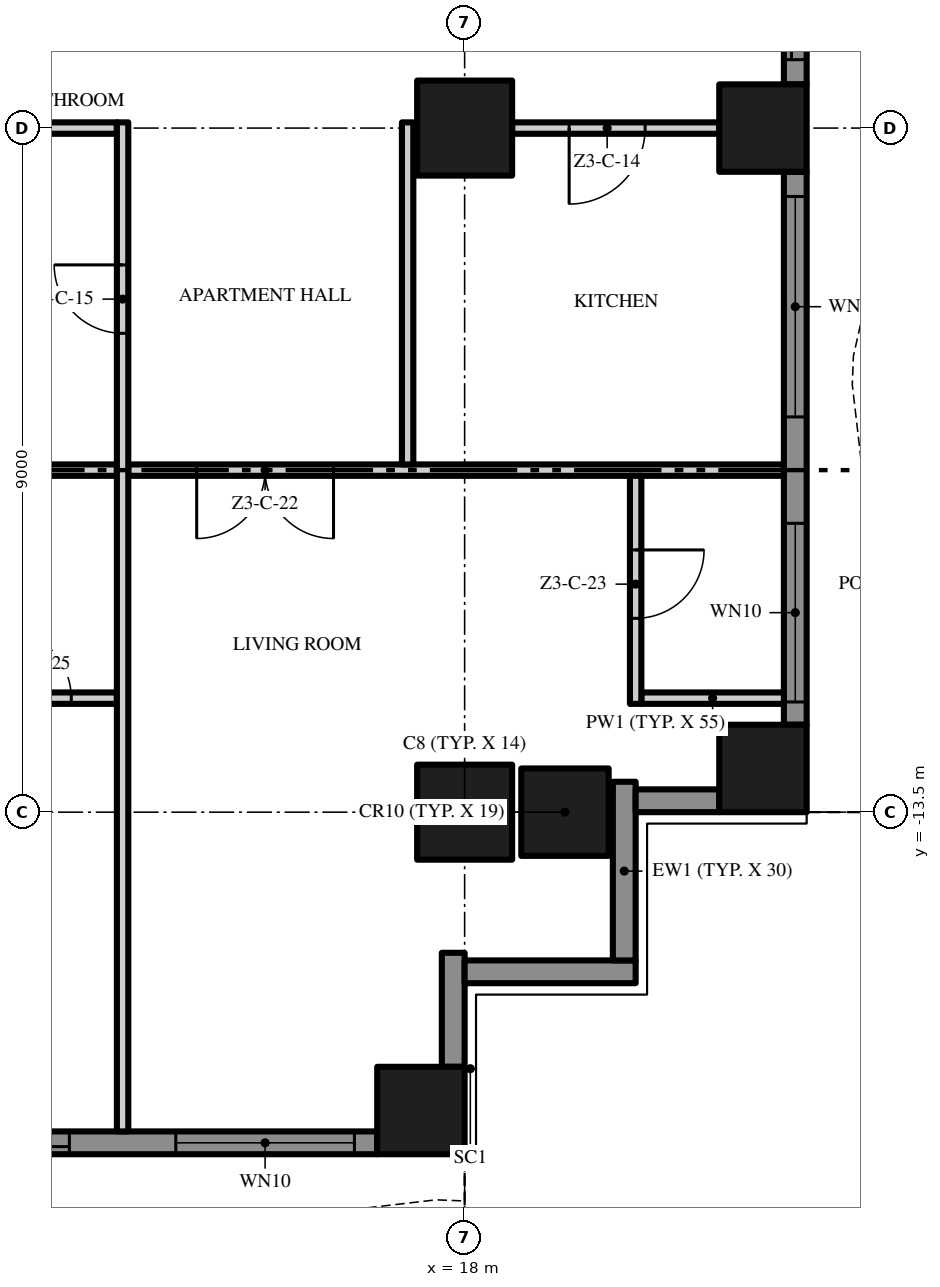
"""IFC4 building model, lengths in metres.
Left out: names, types, materials, properties, quantities, classifications, styles, units other than length and angle.
Written with IfcOpenShell. Run it as: python <this file> out.ifc"""

import sys

from ifc_helpers import new_model, si_unit, direction, frame, frame_2d, origin, origin_2d, place, context, subcontext, project, spatial, polyline, rectangle, outline, extrude, element, fill, save


model = new_model("IFC4")
c1 = context("Model", 3, precision=1e-05, world=origin(), true_north=direction((0.0, 1.0)))
c2 = subcontext(c1, "Body", "Model", "MODEL_VIEW")
j1 = project(units=[si_unit("LENGTHUNIT", "METRE"), si_unit("PLANEANGLEUNIT", "RADIAN")], contexts=[c1])
p1 = place(None, origin())
s1 = spatial("IfcSite", under=j1, at=p1, CompositionType="ELEMENT")
p2 = place(p1, origin())
s2 = spatial("IfcBuilding", under=s1, at=p2, CompositionType="ELEMENT")
p3 = place(p2, frame((0.0, 0.0, 155.4)))
s3 = spatial("IfcBuildingStorey", under=s2, at=p3, CompositionType="ELEMENT", Elevation=155.4)
p4 = place(p3, frame((18.0, -13.5, 0.0), z_axis=(0.0, 0.0, 1.0), x_axis=(1.0, 0.0, 0.0)))
e1 = element("IfcColumn", 1, at=p4, inside=s3, PredefinedType="COLUMN", context=c2, shape_type="SweptSolid", body=[
    extrude(rectangle(XDim=1.25, YDim=1.25, at=origin_2d()), origin(), (0.0, 0.0, 1.0), 3.5),
])
p5 = place(p3, frame((17.425, -17.425, 0.0), z_axis=(0.0, 0.0, 1.0), x_axis=(1.0, 0.0, 0.0)))
e2 = element("IfcColumn", 2, at=p5, inside=s3, PredefinedType="COLUMN", context=c2, shape_type="SweptSolid", body=[
    extrude(rectangle(XDim=1.15, YDim=1.15, at=origin_2d()), origin(), (0.0, 0.0, 1.0), 3.5),
])
p6 = place(p3, frame((18.0, -4.5, 0.0), z_axis=(0.0, 0.0, 1.0), x_axis=(1.0, 0.0, 0.0)))
e3 = element("IfcColumn", 3, at=p6, inside=s3, PredefinedType="COLUMN", context=c2, shape_type="SweptSolid", body=[
    extrude(rectangle(XDim=1.25, YDim=1.25, at=origin_2d()), origin(), (0.0, 0.0, 1.0), 3.5),
])
for number, where, z_axis, x_axis in (
    (4, (21.925, -12.925, 0.0), (0.0, 0.0, 1.0), (1.0, 0.0, 0.0)),
    (5, (19.32, -13.5, 0.0), (0.0, 0.0, 1.0), (1.0, 0.0, 0.0)),
    (6, (21.925, -4.5, 0.0), (0.0, 0.0, 1.0), (1.0, 0.0, 0.0)),
):
    element("IfcColumn", number, at=place(p3, frame(where, z_axis=z_axis, x_axis=x_axis)), inside=s3, PredefinedType="COLUMN", context=c2, shape_type="SweptSolid", body=[
        extrude(rectangle(XDim=1.15, YDim=1.15, at=origin_2d()), origin(), (0.0, 0.0, 1.0), 3.5),
    ])
p7 = place(p3, frame((16.85, -17.85, 0.0), z_axis=(0.0, 0.0, 1.0), x_axis=(-1.0, 0.0, 0.0)))
e7 = element("IfcWall", 7, at=p7, inside=s3, PredefinedType="SOLIDWALL", context=c2, shape_type="SweptSolid", body=[
    extrude(rectangle(XDim=7.275, YDim=0.3, at=frame_2d((3.638, 0.0))), origin(), (0.0, 0.0, 1.0), 3.5),
])
p8 = place(p7, frame((4.05, 0.0, 0.0)))
e8 = element("IfcOpeningElement", 8, at=p8, cuts=e7, PredefinedType="OPENING", context=c2, shape_type="SweptSolid", body=[
    extrude(rectangle(XDim=2.9, YDim=2.4, at=frame_2d((1.45, 1.2))), frame((0.0, 0.16, 0.0), z_axis=(0.0, -1.0, 0.0), x_axis=(1.0, 0.0, 0.0)), (0.0, 0.0, 1.0), 0.32),
])
p9 = place(p7, frame((0.3, 0.0, 0.45)))
e9 = element("IfcOpeningElement", 9, at=p9, cuts=e7, PredefinedType="OPENING", context=c2, shape_type="SweptSolid", body=[
    extrude(rectangle(XDim=2.35, YDim=2.65, at=frame_2d((1.175, 1.325))), frame((0.0, 0.16, 0.0), z_axis=(0.0, -1.0, 0.0), x_axis=(1.0, 0.0, 0.0)), (0.0, 0.0, 1.0), 0.32),
])
p10 = place(p3, frame((17.85, -15.35, 0.0), z_axis=(0.0, 0.0, 1.0), x_axis=(0.0, -1.0, 0.0)))
e10 = element("IfcWall", 10, at=p10, inside=s3, PredefinedType="SOLIDWALL", context=c2, shape_type="SweptSolid", body=[
    extrude(rectangle(XDim=1.5, YDim=0.3, at=frame_2d((0.75, 0.0))), origin(), (0.0, 0.0, 1.0), 3.5),
])
p11 = place(p3, frame((20.25, -15.6, 0.0), z_axis=(0.0, 0.0, 1.0), x_axis=(-1.0, 0.0, 0.0)))
e11 = element("IfcWall", 11, at=p11, inside=s3, PredefinedType="SOLIDWALL", context=c2, shape_type="SweptSolid", body=[
    extrude(rectangle(XDim=2.25, YDim=0.3, at=frame_2d((1.125, 0.0))), origin(), (0.0, 0.0, 1.0), 3.5),
])
p12 = place(p3, frame((20.1, -13.1, 0.0), z_axis=(0.0, 0.0, 1.0), x_axis=(0.0, -1.0, 0.0)))
e12 = element("IfcWall", 12, at=p12, inside=s3, PredefinedType="SOLIDWALL", context=c2, shape_type="SweptSolid", body=[
    extrude(rectangle(XDim=2.35, YDim=0.3, at=frame_2d((1.175, 0.0))), origin(), (0.0, 0.0, 1.0), 3.5),
])
p13 = place(p3, frame((21.35, -13.35, 0.0), z_axis=(0.0, 0.0, 1.0), x_axis=(-1.0, 0.0, 0.0)))
e13 = element("IfcWall", 13, at=p13, inside=s3, PredefinedType="SOLIDWALL", context=c2, shape_type="SweptSolid", body=[
    extrude(rectangle(XDim=1.1, YDim=0.3, at=frame_2d((0.55, 0.0))), origin(), (0.0, 0.0, 1.0), 3.5),
])
p14 = place(p3, frame((22.35, -5.075, 0.0), z_axis=(0.0, 0.0, 1.0), x_axis=(0.0, -1.0, 0.0)))
e14 = element("IfcWall", 14, at=p14, inside=s3, PredefinedType="SOLIDWALL", context=c2, shape_type="SweptSolid", body=[
    extrude(rectangle(XDim=7.275, YDim=0.3, at=frame_2d((3.638, 0.0))), origin(), (0.0, 0.0, 1.0), 3.5),
])
p15 = place(p14, frame((4.625, 0.0, 0.45)))
e15 = element("IfcOpeningElement", 15, at=p15, cuts=e14, PredefinedType="OPENING", context=c2, shape_type="SweptSolid", body=[
    extrude(rectangle(XDim=2.35, YDim=2.65, at=frame_2d((1.175, 1.325))), frame((0.0, 0.16, 0.0), z_axis=(0.0, -1.0, 0.0), x_axis=(1.0, 0.0, 0.0)), (0.0, 0.0, 1.0), 0.32),
])
p16 = place(p14, frame((0.325, 0.0, 0.45)))
e16 = element("IfcOpeningElement", 16, at=p16, cuts=e14, PredefinedType="OPENING", context=c2, shape_type="SweptSolid", body=[
    extrude(rectangle(XDim=2.9, YDim=2.65, at=frame_2d((1.45, 1.325))), frame((0.0, 0.16, 0.0), z_axis=(0.0, -1.0, 0.0), x_axis=(1.0, 0.0, 0.0)), (0.0, 0.0, 1.0), 0.32),
])
p17 = place(p3, frame((22.35, 3.925, 0.0), z_axis=(0.0, 0.0, 1.0), x_axis=(0.0, -1.0, 0.0)))
e17 = element("IfcWall", 17, at=p17, inside=s3, PredefinedType="SOLIDWALL", context=c2, shape_type="SweptSolid", body=[
    extrude(rectangle(XDim=7.85, YDim=0.3, at=frame_2d((3.925, 0.0))), origin(), (0.0, 0.0, 1.0), 3.5),
])
p18 = place(p17, frame((4.625, 0.0, 0.0)))
e18 = element("IfcOpeningElement", 18, at=p18, cuts=e17, PredefinedType="OPENING", context=c2, shape_type="SweptSolid", body=[
    extrude(rectangle(XDim=2.9, YDim=2.4, at=frame_2d((1.45, 1.2))), frame((0.0, 0.16, 0.0), z_axis=(0.0, -1.0, 0.0), x_axis=(1.0, 0.0, 0.0)), (0.0, 0.0, 1.0), 0.32),
])
p19 = place(p17, frame((0.325, 0.0, 0.0)))
e19 = element("IfcOpeningElement", 19, at=p19, cuts=e17, PredefinedType="OPENING", context=c2, shape_type="SweptSolid", body=[
    extrude(rectangle(XDim=2.9, YDim=2.4, at=frame_2d((1.45, 1.2))), frame((0.0, 0.16, 0.0), z_axis=(0.0, -1.0, 0.0), x_axis=(1.0, 0.0, 0.0)), (0.0, 0.0, 1.0), 0.32),
])
p20 = place(p3, origin())
e20 = element("IfcWall", 20, at=p20, inside=s3, PredefinedType="USERDEFINED", context=c2, shape_type="SweptSolid", body=[
    extrude(outline(polyline([(-18.0, -20.649), (-16.5, -19.988), (-15.0, -19.255), (-13.5, -18.731), (-12.375, -18.6), (-12.0, -18.615), (-10.5, -18.951), (-9.0, -19.612), (-7.5, -20.345), (-6.0, -20.869), (-4.875, -21.0), (-4.5, -20.985), (-3.0, -20.649), (-1.5, -19.988), (0.0, -19.255), (1.5, -18.731), (2.625, -18.6), (3.0, -18.615), (4.5, -18.951), (6.0, -19.612), (7.5, -20.345), (9.0, -20.869), (10.125, -21.0), (10.5, -20.985), (12.0, -20.649), (13.5, -19.988), (15.0, -19.255), (16.5, -18.731), (17.625, -18.6), (18.0, -18.615), (18.01, -18.365), (17.615, -18.349), (16.444, -18.486), (14.904, -19.024), (13.395, -19.761), (11.921, -20.41), (10.467, -20.736), (10.135, -20.749), (9.056, -20.624), (7.596, -20.114), (6.105, -19.385), (4.579, -18.713), (3.033, -18.366), (2.615, -18.349), (1.444, -18.486), (-0.096, -19.024), (-1.605, -19.761), (-3.079, -20.41), (-4.533, -20.736), (-4.865, -20.749), (-5.944, -20.624), (-7.404, -20.114), (-8.895, -19.385), (-10.421, -18.713), (-11.967, -18.366), (-12.385, -18.349), (-13.556, -18.486), (-15.096, -19.024), (-16.605, -19.761), (-18.101, -20.42), (-18.0, -20.649)])), origin(), (0.0, 0.0, 1.0), 0.9),
])
p21 = place(p3, origin())
e21 = element("IfcWall", 21, at=p21, inside=s3, PredefinedType="USERDEFINED", context=c2, shape_type="SweptSolid", body=[
    extrude(outline(polyline([(25.149, -13.5), (24.488, -12.0), (23.755, -10.5), (23.231, -9.0), (23.1, -7.875), (23.115, -7.5), (23.451, -6.0), (24.112, -4.5), (24.845, -3.0), (25.369, -1.5), (25.5, -0.375), (25.485, 0.0), (25.149, 1.5), (24.488, 3.0), (23.755, 4.5), (23.231, 6.0), (23.1, 7.125), (23.115, 7.5), (23.451, 9.0), (24.112, 10.5), (24.845, 12.0), (25.369, 13.5), (25.5, 14.625), (25.485, 15.0), (25.149, 16.5), (24.488, 18.0), (24.259, 17.899), (24.91, 16.421), (25.236, 14.967), (25.249, 14.635), (25.124, 13.556), (24.614, 12.096), (23.885, 10.605), (23.213, 9.079), (22.866, 7.533), (22.849, 7.115), (22.986, 5.944), (23.524, 4.404), (24.261, 2.895), (24.91, 1.421), (25.236, -0.033), (25.249, -0.365), (25.124, -1.444), (24.614, -2.904), (23.885, -4.395), (23.213, -5.921), (22.866, -7.467), (22.849, -7.885), (22.986, -9.056), (23.524, -10.596), (24.261, -12.105), (24.92, -13.601), (25.149, -13.5)])), origin(), (0.0, 0.0, 1.0), 0.9),
])
p22 = place(p3, frame((11.325, -12.0, 0.0), z_axis=(0.0, 0.0, 1.0), x_axis=(1.0, 0.0, 0.0)))
e22 = element("IfcWall", 22, at=p22, inside=s3, PredefinedType="PARTITIONING", context=c2, shape_type="SweptSolid", body=[
    extrude(rectangle(XDim=2.1, YDim=0.15, at=frame_2d((1.05, 0.0))), origin(), (0.0, 0.0, 1.0), 3.5),
])
p23 = place(p22, frame((0.6, 0.0, 0.0)))
e23 = element("IfcOpeningElement", 23, at=p23, cuts=e22, PredefinedType="OPENING", context=c2, shape_type="SweptSolid", body=[
    extrude(rectangle(XDim=0.9, YDim=2.1, at=frame_2d((0.45, 1.05))), frame((0.0, 0.085, 0.0), z_axis=(0.0, -1.0, 0.0), x_axis=(1.0, 0.0, 0.0)), (0.0, 0.0, 1.0), 0.17),
])
p24 = place(p3, frame((20.325, -12.0, 0.0), z_axis=(0.0, 0.0, 1.0), x_axis=(1.0, 0.0, 0.0)))
e24 = element("IfcWall", 24, at=p24, inside=s3, PredefinedType="PARTITIONING", context=c2, shape_type="SweptSolid", body=[
    extrude(rectangle(XDim=1.875, YDim=0.15, at=frame_2d((0.938, 0.0))), origin(), (0.0, 0.0, 1.0), 3.5),
])
p25 = place(p3, frame((11.325, -9.0, 0.0), z_axis=(0.0, 0.0, 1.0), x_axis=(1.0, 0.0, 0.0)))
e25 = element("IfcWall", 25, at=p25, inside=s3, PredefinedType="PARTITIONING", context=c2, shape_type="SweptSolid", body=[
    extrude(rectangle(XDim=2.1, YDim=0.15, at=frame_2d((1.05, 0.0))), origin(), (0.0, 0.0, 1.0), 3.5),
])
p26 = place(p3, frame((22.2, -9.0, 0.0), z_axis=(0.0, 0.0, 1.0), x_axis=(-1.0, 0.0, 0.0)))
e26 = element("IfcWall", 26, at=p26, inside=s3, PredefinedType="PARTITIONING", context=c2, shape_type="SweptSolid", body=[
    extrude(rectangle(XDim=8.625, YDim=0.15, at=frame_2d((4.312, 0.0))), origin(), (0.0, 0.0, 1.0), 3.5),
])
p27 = place(p26, frame((5.925, 0.0, 0.0)))
e27 = element("IfcOpeningElement", 27, at=p27, cuts=e26, PredefinedType="OPENING", context=c2, shape_type="SweptSolid", body=[
    extrude(rectangle(XDim=1.8, YDim=2.4, at=frame_2d((0.9, 1.2))), frame((0.0, 0.085, 0.0), z_axis=(0.0, -1.0, 0.0), x_axis=(1.0, 0.0, 0.0)), (0.0, 0.0, 1.0), 0.17),
])
p28 = place(p3, frame((11.325, -4.5, 0.0), z_axis=(0.0, 0.0, 1.0), x_axis=(1.0, 0.0, 0.0)))
e28 = element("IfcWall", 28, at=p28, inside=s3, PredefinedType="PARTITIONING", context=c2, shape_type="SweptSolid", body=[
    extrude(rectangle(XDim=2.1, YDim=0.15, at=frame_2d((1.05, 0.0))), origin(), (0.0, 0.0, 1.0), 3.5),
])
p29 = place(p3, frame((21.35, -4.5, 0.0), z_axis=(0.0, 0.0, 1.0), x_axis=(-1.0, 0.0, 0.0)))
e29 = element("IfcWall", 29, at=p29, inside=s3, PredefinedType="PARTITIONING", context=c2, shape_type="SweptSolid", body=[
    extrude(rectangle(XDim=2.725, YDim=0.15, at=frame_2d((1.363, 0.0))), origin(), (0.0, 0.0, 1.0), 3.5),
])
p30 = place(p29, frame((0.975, 0.0, 0.0)))
e30 = element("IfcOpeningElement", 30, at=p30, cuts=e29, PredefinedType="OPENING", context=c2, shape_type="SweptSolid", body=[
    extrude(rectangle(XDim=1.0, YDim=2.4, at=frame_2d((0.5, 1.2))), frame((0.0, 0.085, 0.0), z_axis=(0.0, -1.0, 0.0), x_axis=(1.0, 0.0, 0.0)), (0.0, 0.0, 1.0), 0.17),
])
p31 = place(p3, frame((13.5, -17.7, 0.0), z_axis=(0.0, 0.0, 1.0), x_axis=(0.0, 1.0, 0.0)))
e31 = element("IfcWall", 31, at=p31, inside=s3, PredefinedType="PARTITIONING", context=c2, shape_type="SweptSolid", body=[
    extrude(rectangle(XDim=13.275, YDim=0.15, at=frame_2d((6.638, 0.0))), origin(), (0.0, 0.0, 1.0), 3.5),
])
p32 = place(p31, frame((10.5, 0.0, 0.0)))
e32 = element("IfcOpeningElement", 32, at=p32, cuts=e31, PredefinedType="OPENING", context=c2, shape_type="SweptSolid", body=[
    extrude(rectangle(XDim=0.9, YDim=2.1, at=frame_2d((0.45, 1.05))), frame((0.0, 0.085, 0.0), z_axis=(0.0, -1.0, 0.0), x_axis=(1.0, 0.0, 0.0)), (0.0, 0.0, 1.0), 0.17),
])
p33 = place(p3, frame((17.25, -8.925, 0.0), z_axis=(0.0, 0.0, 1.0), x_axis=(0.0, 1.0, 0.0)))
e33 = element("IfcWall", 33, at=p33, inside=s3, PredefinedType="PARTITIONING", context=c2, shape_type="SweptSolid", body=[
    extrude(rectangle(XDim=4.5, YDim=0.15, at=frame_2d((2.25, 0.0))), origin(), (0.0, 0.0, 1.0), 3.5),
])
p34 = place(p3, frame((20.25, -9.075, 0.0), z_axis=(0.0, 0.0, 1.0), x_axis=(0.0, -1.0, 0.0)))
e34 = element("IfcWall", 34, at=p34, inside=s3, PredefinedType="PARTITIONING", context=c2, shape_type="SweptSolid", body=[
    extrude(rectangle(XDim=3.0, YDim=0.15, at=frame_2d((1.5, 0.0))), origin(), (0.0, 0.0, 1.0), 3.5),
])
p35 = place(p34, frame((0.975, 0.0, 0.0)))
e35 = element("IfcOpeningElement", 35, at=p35, cuts=e34, PredefinedType="OPENING", context=c2, shape_type="SweptSolid", body=[
    extrude(rectangle(XDim=0.9, YDim=2.1, at=frame_2d((0.45, 1.05))), frame((0.0, 0.085, 0.0), z_axis=(0.0, -1.0, 0.0), x_axis=(1.0, 0.0, 0.0)), (0.0, 0.0, 1.0), 0.17),
])
p36 = place(p8, origin())
e36 = element("IfcDoor", 36, at=p36, inside=s3, OperationType="SINGLE_SWING_LEFT", PredefinedType="DOOR", context=c2, shape_type="SweptSolid", body=[
    extrude(rectangle(XDim=2.9, YDim=2.4, at=frame_2d((1.45, 1.2))), frame((0.0, 0.025, 0.0), z_axis=(0.0, -1.0, 0.0), x_axis=(1.0, 0.0, 0.0)), (0.0, 0.0, 1.0), 0.05),
])
fill(e8, e36)
p37 = place(p9, origin())
e37 = element("IfcWindow", 37, at=p37, inside=s3, PartitioningType="SINGLE_PANEL", PredefinedType="WINDOW", context=c2, shape_type="SweptSolid", body=[
    extrude(rectangle(XDim=2.35, YDim=2.65, at=frame_2d((1.175, 1.325))), frame((0.0, 0.03, 0.0), z_axis=(0.0, -1.0, 0.0), x_axis=(1.0, 0.0, 0.0)), (0.0, 0.0, 1.0), 0.06),
])
fill(e9, e37)
p38 = place(p15, origin())
e38 = element("IfcWindow", 38, at=p38, inside=s3, PartitioningType="SINGLE_PANEL", PredefinedType="WINDOW", context=c2, shape_type="SweptSolid", body=[
    extrude(rectangle(XDim=2.35, YDim=2.65, at=frame_2d((1.175, 1.325))), frame((0.0, 0.03, 0.0), z_axis=(0.0, -1.0, 0.0), x_axis=(1.0, 0.0, 0.0)), (0.0, 0.0, 1.0), 0.06),
])
fill(e15, e38)
p39 = place(p16, origin())
e39 = element("IfcWindow", 39, at=p39, inside=s3, PartitioningType="SINGLE_PANEL", PredefinedType="WINDOW", context=c2, shape_type="SweptSolid", body=[
    extrude(rectangle(XDim=2.9, YDim=2.65, at=frame_2d((1.45, 1.325))), frame((0.0, 0.03, 0.0), z_axis=(0.0, -1.0, 0.0), x_axis=(1.0, 0.0, 0.0)), (0.0, 0.0, 1.0), 0.06),
])
fill(e16, e39)
p40 = place(p18, origin())
e40 = element("IfcDoor", 40, at=p40, inside=s3, OperationType="SINGLE_SWING_LEFT", PredefinedType="DOOR", context=c2, shape_type="SweptSolid", body=[
    extrude(rectangle(XDim=2.9, YDim=2.4, at=frame_2d((1.45, 1.2))), frame((0.0, 0.025, 0.0), z_axis=(0.0, -1.0, 0.0), x_axis=(1.0, 0.0, 0.0)), (0.0, 0.0, 1.0), 0.05),
])
fill(e18, e40)
p41 = place(p30, origin())
e41 = element("IfcDoor", 41, at=p41, inside=s3, OperationType="SINGLE_SWING_RIGHT", PredefinedType="DOOR", context=c2, shape_type="SweptSolid", body=[
    extrude(rectangle(XDim=1.0, YDim=2.4, at=frame_2d((0.5, 1.2))), frame((0.0, 0.025, 0.0), z_axis=(0.0, -1.0, 0.0), x_axis=(1.0, 0.0, 0.0)), (0.0, 0.0, 1.0), 0.05),
])
fill(e30, e41)
p42 = place(p32, origin())
e42 = element("IfcDoor", 42, at=p42, inside=s3, OperationType="SINGLE_SWING_RIGHT", PredefinedType="DOOR", context=c2, shape_type="SweptSolid", body=[
    extrude(rectangle(XDim=0.9, YDim=2.1, at=frame_2d((0.45, 1.05))), frame((0.0, 0.025, 0.0), z_axis=(0.0, -1.0, 0.0), x_axis=(1.0, 0.0, 0.0)), (0.0, 0.0, 1.0), 0.05),
])
fill(e32, e42)
p43 = place(p27, origin())
e43 = element("IfcDoor", 43, at=p43, inside=s3, OperationType="DOUBLE_DOOR_SINGLE_SWING", PredefinedType="DOOR", context=c2, shape_type="SweptSolid", body=[
    extrude(rectangle(XDim=1.8, YDim=2.4, at=frame_2d((0.9, 1.2))), frame((0.0, 0.025, 0.0), z_axis=(0.0, -1.0, 0.0), x_axis=(1.0, 0.0, 0.0)), (0.0, 0.0, 1.0), 0.05),
])
fill(e27, e43)
p44 = place(p35, origin())
e44 = element("IfcDoor", 44, at=p44, inside=s3, OperationType="SINGLE_SWING_LEFT", PredefinedType="DOOR", context=c2, shape_type="SweptSolid", body=[
    extrude(rectangle(XDim=0.9, YDim=2.1, at=frame_2d((0.45, 1.05))), frame((0.0, 0.025, 0.0), z_axis=(0.0, -1.0, 0.0), x_axis=(1.0, 0.0, 0.0)), (0.0, 0.0, 1.0), 0.05),
])
fill(e35, e44)
p45 = place(p23, origin())
e45 = element("IfcDoor", 45, at=p45, inside=s3, OperationType="SINGLE_SWING_LEFT", PredefinedType="DOOR", context=c2, shape_type="SweptSolid", body=[
    extrude(rectangle(XDim=0.9, YDim=2.1, at=frame_2d((0.45, 1.05))), frame((0.0, 0.025, 0.0), z_axis=(0.0, -1.0, 0.0), x_axis=(1.0, 0.0, 0.0)), (0.0, 0.0, 1.0), 0.05),
])
fill(e23, e45)
save(model, sys.argv[1])
